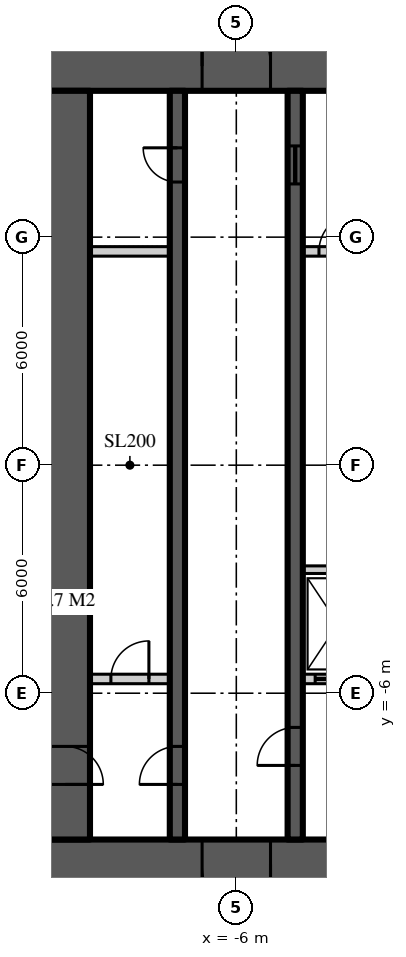
"""IFC4 building model, lengths in metres.
Left out: names, types, materials, properties, quantities, classifications, styles, units other than length and angle.
Written with IfcOpenShell. Run it as: python <this file> out.ifc"""

import sys

from ifc_helpers import new_model, si_unit, direction, frame, frame_2d, origin, place, context, subcontext, project, spatial, rectangle, extrude, element, fill, save


model = new_model("IFC4")
c1 = context("Model", 3, precision=1e-05, world=origin(), true_north=direction((0.0, 1.0)))
c2 = subcontext(c1, "Body", "Model", "MODEL_VIEW")
j1 = project(units=[si_unit("LENGTHUNIT", "METRE"), si_unit("PLANEANGLEUNIT", "RADIAN")], contexts=[c1])
p1 = place(None, origin())
s1 = spatial("IfcSite", under=j1, at=p1, CompositionType="ELEMENT")
p2 = place(p1, origin())
s2 = spatial("IfcBuilding", under=s1, at=p2, CompositionType="ELEMENT")
p3 = place(p2, frame((0.0, 0.0, 204.9)))
s3 = spatial("IfcBuildingStorey", under=s2, at=p3, CompositionType="ELEMENT", Elevation=204.9)
p4 = place(p3, frame((-11.15, 10.5, 0.0), z_axis=(0.0, 0.0, 1.0), x_axis=(1.0, 0.0, 0.0)))
e1 = element("IfcWall", 1, at=p4, inside=s3, PredefinedType="SHEAR", context=c2, shape_type="SweptSolid", body=[
    extrude(rectangle(XDim=22.3, YDim=1.3, at=frame_2d((11.15, 0.0))), origin(), (0.0, 0.0, 1.0), 3.9),
])
p5 = place(p4, frame((4.25, 0.0, 0.0)))
e2 = element("IfcOpeningElement", 2, at=p5, cuts=e1, PredefinedType="OPENING", context=c2, shape_type="SweptSolid", body=[
    extrude(rectangle(XDim=1.8, YDim=2.2, at=frame_2d((0.9, 1.1))), frame((0.0, 0.66, 0.0), z_axis=(0.0, -1.0, 0.0), x_axis=(1.0, 0.0, 0.0)), (0.0, 0.0, 1.0), 1.32),
])
p6 = place(p4, frame((16.25, 0.0, 0.0)))
e3 = element("IfcOpeningElement", 3, at=p6, cuts=e1, PredefinedType="OPENING", context=c2, shape_type="SweptSolid", body=[
    extrude(rectangle(XDim=1.8, YDim=2.2, at=frame_2d((0.9, 1.1))), frame((0.0, 0.66, 0.0), z_axis=(0.0, -1.0, 0.0), x_axis=(1.0, 0.0, 0.0)), (0.0, 0.0, 1.0), 1.32),
])
p7 = place(p3, frame((11.15, -10.5, 0.0), z_axis=(0.0, 0.0, 1.0), x_axis=(-1.0, 0.0, 0.0)))
e4 = element("IfcWall", 4, at=p7, inside=s3, PredefinedType="SHEAR", context=c2, shape_type="SweptSolid", body=[
    extrude(rectangle(XDim=22.3, YDim=1.3, at=frame_2d((11.15, 0.0))), origin(), (0.0, 0.0, 1.0), 3.9),
])
p8 = place(p7, frame((16.25, 0.0, 0.0)))
e5 = element("IfcOpeningElement", 5, at=p8, cuts=e4, PredefinedType="OPENING", context=c2, shape_type="SweptSolid", body=[
    extrude(rectangle(XDim=1.8, YDim=2.2, at=frame_2d((0.9, 1.1))), frame((0.0, 0.66, 0.0), z_axis=(0.0, -1.0, 0.0), x_axis=(1.0, 0.0, 0.0)), (0.0, 0.0, 1.0), 1.32),
])
p9 = place(p7, frame((4.25, 0.0, 0.0)))
e6 = element("IfcOpeningElement", 6, at=p9, cuts=e4, PredefinedType="OPENING", context=c2, shape_type="SweptSolid", body=[
    extrude(rectangle(XDim=1.8, YDim=2.2, at=frame_2d((0.9, 1.1))), frame((0.0, 0.66, 0.0), z_axis=(0.0, -1.0, 0.0), x_axis=(1.0, 0.0, 0.0)), (0.0, 0.0, 1.0), 1.32),
])
p10 = place(p3, frame((-10.5, 9.85, 0.0), z_axis=(0.0, 0.0, 1.0), x_axis=(0.0, -1.0, 0.0)))
e7 = element("IfcWall", 7, at=p10, inside=s3, PredefinedType="SHEAR", context=c2, shape_type="SweptSolid", body=[
    extrude(rectangle(XDim=19.7, YDim=1.3, at=frame_2d((9.85, 0.0))), origin(), (0.0, 0.0, 1.0), 3.9),
])
p11 = place(p10, frame((17.25, 0.0, 0.0)))
e8 = element("IfcOpeningElement", 8, at=p11, cuts=e7, PredefinedType="OPENING", context=c2, shape_type="SweptSolid", body=[
    extrude(rectangle(XDim=1.0, YDim=2.2, at=frame_2d((0.5, 1.1))), frame((0.0, 0.66, 0.0), z_axis=(0.0, -1.0, 0.0), x_axis=(1.0, 0.0, 0.0)), (0.0, 0.0, 1.0), 1.32),
])
p12 = place(p3, frame((-7.55, -9.85, 0.0), z_axis=(0.0, 0.0, 1.0), x_axis=(0.0, 1.0, 0.0)))
e9 = element("IfcWall", 9, at=p12, inside=s3, PredefinedType="SHEAR", context=c2, shape_type="SweptSolid", body=[
    extrude(rectangle(XDim=19.7, YDim=0.4, at=frame_2d((9.85, 0.0))), origin(), (0.0, 0.0, 1.0), 3.9),
])
p13 = place(p12, frame((1.45, 0.0, 0.0)))
e10 = element("IfcOpeningElement", 10, at=p13, cuts=e9, PredefinedType="OPENING", context=c2, shape_type="SweptSolid", body=[
    extrude(rectangle(XDim=1.0, YDim=2.2, at=frame_2d((0.5, 1.1))), frame((0.0, 0.21, 0.0), z_axis=(0.0, -1.0, 0.0), x_axis=(1.0, 0.0, 0.0)), (0.0, 0.0, 1.0), 0.42),
])
p14 = place(p12, frame((17.3, 0.0, 0.0)))
e11 = element("IfcOpeningElement", 11, at=p14, cuts=e9, PredefinedType="OPENING", context=c2, shape_type="SweptSolid", body=[
    extrude(rectangle(XDim=0.9, YDim=2.1, at=frame_2d((0.45, 1.05))), frame((0.0, 0.21, 0.0), z_axis=(0.0, -1.0, 0.0), x_axis=(1.0, 0.0, 0.0)), (0.0, 0.0, 1.0), 0.42),
])
p15 = place(p3, frame((-4.45, -9.85, 0.0), z_axis=(0.0, 0.0, 1.0), x_axis=(0.0, 1.0, 0.0)))
e12 = element("IfcWall", 12, at=p15, inside=s3, PredefinedType="SHEAR", context=c2, shape_type="SweptSolid", body=[
    extrude(rectangle(XDim=19.7, YDim=0.4, at=frame_2d((9.85, 0.0))), origin(), (0.0, 0.0, 1.0), 3.9),
])
p16 = place(p15, frame((1.95, 0.0, 0.0)))
e13 = element("IfcOpeningElement", 13, at=p16, cuts=e12, PredefinedType="OPENING", context=c2, shape_type="SweptSolid", body=[
    extrude(rectangle(XDim=1.0, YDim=2.2, at=frame_2d((0.5, 1.1))), frame((0.0, 0.21, 0.0), z_axis=(0.0, -1.0, 0.0), x_axis=(1.0, 0.0, 0.0)), (0.0, 0.0, 1.0), 0.42),
])
p17 = place(p15, frame((17.25, 0.0, 0.0)))
e14 = element("IfcOpeningElement", 14, at=p17, cuts=e12, PredefinedType="OPENING", context=c2, shape_type="SweptSolid", body=[
    extrude(rectangle(XDim=1.0, YDim=2.1, at=frame_2d((0.5, 1.05))), frame((0.0, 0.21, 0.0), z_axis=(0.0, -1.0, 0.0), x_axis=(1.0, 0.0, 0.0)), (0.0, 0.0, 1.0), 0.42),
])
p18 = place(p3, frame((-9.85, 5.625, 0.0), z_axis=(0.0, 0.0, 1.0), x_axis=(1.0, 0.0, 0.0)))
e15 = element("IfcWall", 15, at=p18, inside=s3, PredefinedType="SOLIDWALL", context=c2, shape_type="SweptSolid", body=[
    extrude(rectangle(XDim=2.1, YDim=0.25, at=frame_2d((1.05, 0.0))), origin(), (0.0, 0.0, 1.0), 3.7),
])
p19 = place(p3, frame((-4.25, 5.625, 0.0), z_axis=(0.0, 0.0, 1.0), x_axis=(1.0, 0.0, 0.0)))
e16 = element("IfcWall", 16, at=p19, inside=s3, PredefinedType="SOLIDWALL", context=c2, shape_type="SweptSolid", body=[
    extrude(rectangle(XDim=1.85, YDim=0.25, at=frame_2d((0.925, 0.0))), origin(), (0.0, 0.0, 1.0), 3.7),
])
p20 = place(p19, frame((0.425, 0.0, 0.0)))
e17 = element("IfcOpeningElement", 17, at=p20, cuts=e16, PredefinedType="OPENING", context=c2, shape_type="SweptSolid", body=[
    extrude(rectangle(XDim=1.0, YDim=2.2, at=frame_2d((0.5, 1.1))), frame((0.0, 0.135, 0.0), z_axis=(0.0, -1.0, 0.0), x_axis=(1.0, 0.0, 0.0)), (0.0, 0.0, 1.0), 0.27),
])
p21 = place(p3, frame((-9.85, -5.625, 0.0), z_axis=(0.0, 0.0, 1.0), x_axis=(1.0, 0.0, 0.0)))
e18 = element("IfcWall", 18, at=p21, inside=s3, PredefinedType="SOLIDWALL", context=c2, shape_type="SweptSolid", body=[
    extrude(rectangle(XDim=2.1, YDim=0.25, at=frame_2d((1.05, 0.0))), origin(), (0.0, 0.0, 1.0), 3.7),
])
p22 = place(p21, frame((0.55, 0.0, 0.0)))
e19 = element("IfcOpeningElement", 19, at=p22, cuts=e18, PredefinedType="OPENING", context=c2, shape_type="SweptSolid", body=[
    extrude(rectangle(XDim=1.0, YDim=2.2, at=frame_2d((0.5, 1.1))), frame((0.0, 0.135, 0.0), z_axis=(0.0, -1.0, 0.0), x_axis=(1.0, 0.0, 0.0)), (0.0, 0.0, 1.0), 0.27),
])
p23 = place(p3, frame((-4.25, -5.625, 0.0), z_axis=(0.0, 0.0, 1.0), x_axis=(1.0, 0.0, 0.0)))
e20 = element("IfcWall", 20, at=p23, inside=s3, PredefinedType="SOLIDWALL", context=c2, shape_type="SweptSolid", body=[
    extrude(rectangle(XDim=1.85, YDim=0.25, at=frame_2d((0.925, 0.0))), origin(), (0.0, 0.0, 1.0), 3.7),
])
p24 = place(p23, frame((0.325, 0.0, 0.0)))
e21 = element("IfcOpeningElement", 21, at=p24, cuts=e20, PredefinedType="OPENING", context=c2, shape_type="SweptSolid", body=[
    extrude(rectangle(XDim=1.2, YDim=2.2, at=frame_2d((0.6, 1.1))), frame((0.0, 0.135, 0.0), z_axis=(0.0, -1.0, 0.0), x_axis=(1.0, 0.0, 0.0)), (0.0, 0.0, 1.0), 0.27),
])
p25 = place(p3, frame((-4.25, -2.75, 0.0), z_axis=(0.0, 0.0, 1.0), x_axis=(1.0, 0.0, 0.0)))
e22 = element("IfcWall", 22, at=p25, inside=s3, PredefinedType="SOLIDWALL", context=c2, shape_type="SweptSolid", body=[
    extrude(rectangle(XDim=1.85, YDim=0.2, at=frame_2d((0.925, 0.0))), origin(), (0.0, 0.0, 1.0), 3.7),
])
p26 = place(p5, origin())
e23 = element("IfcDoor", 23, at=p26, inside=s3, OperationType="DOUBLE_DOOR_DOUBLE_SWING", PredefinedType="DOOR", context=c2, shape_type="SweptSolid", body=[
    extrude(rectangle(XDim=1.8, YDim=2.2, at=frame_2d((0.9, 1.1))), frame((0.0, 0.025, 0.0), z_axis=(0.0, -1.0, 0.0), x_axis=(1.0, 0.0, 0.0)), (0.0, 0.0, 1.0), 0.05),
])
fill(e2, e23)
p27 = place(p8, origin())
e24 = element("IfcDoor", 24, at=p27, inside=s3, OperationType="DOUBLE_DOOR_DOUBLE_SWING", PredefinedType="DOOR", context=c2, shape_type="SweptSolid", body=[
    extrude(rectangle(XDim=1.8, YDim=2.2, at=frame_2d((0.9, 1.1))), frame((0.0, 0.025, 0.0), z_axis=(0.0, -1.0, 0.0), x_axis=(1.0, 0.0, 0.0)), (0.0, 0.0, 1.0), 0.05),
])
fill(e5, e24)
p28 = place(p13, origin())
e25 = element("IfcDoor", 25, at=p28, inside=s3, OperationType="SINGLE_SWING_LEFT", PredefinedType="DOOR", context=c2, shape_type="SweptSolid", body=[
    extrude(rectangle(XDim=1.0, YDim=2.2, at=frame_2d((0.5, 1.1))), frame((0.0, 0.025, 0.0), z_axis=(0.0, -1.0, 0.0), x_axis=(1.0, 0.0, 0.0)), (0.0, 0.0, 1.0), 0.05),
])
fill(e10, e25)
p29 = place(p11, origin())
e26 = element("IfcDoor", 26, at=p29, inside=s3, OperationType="SINGLE_SWING_RIGHT", PredefinedType="DOOR", context=c2, shape_type="SweptSolid", body=[
    extrude(rectangle(XDim=1.0, YDim=2.2, at=frame_2d((0.5, 1.1))), frame((0.0, 0.025, 0.0), z_axis=(0.0, -1.0, 0.0), x_axis=(1.0, 0.0, 0.0)), (0.0, 0.0, 1.0), 0.05),
])
fill(e8, e26)
p30 = place(p16, origin())
e27 = element("IfcDoor", 27, at=p30, inside=s3, OperationType="SINGLE_SWING_LEFT", PredefinedType="DOOR", context=c2, shape_type="SweptSolid", body=[
    extrude(rectangle(XDim=1.0, YDim=2.2, at=frame_2d((0.5, 1.1))), frame((0.0, 0.025, 0.0), z_axis=(0.0, -1.0, 0.0), x_axis=(1.0, 0.0, 0.0)), (0.0, 0.0, 1.0), 0.05),
])
fill(e13, e27)
p31 = place(p14, origin())
e28 = element("IfcDoor", 28, at=p31, inside=s3, OperationType="SINGLE_SWING_RIGHT", PredefinedType="DOOR", context=c2, shape_type="SweptSolid", body=[
    extrude(rectangle(XDim=0.9, YDim=2.1, at=frame_2d((0.45, 1.05))), frame((0.0, 0.025, 0.0), z_axis=(0.0, -1.0, 0.0), x_axis=(1.0, 0.0, 0.0)), (0.0, 0.0, 1.0), 0.05),
])
fill(e11, e28)
p32 = place(p17, origin())
e29 = element("IfcDoor", 29, at=p32, inside=s3, OperationType="SLIDING_TO_LEFT", PredefinedType="DOOR", context=c2, shape_type="SweptSolid", body=[
    extrude(rectangle(XDim=1.0, YDim=2.1, at=frame_2d((0.5, 1.05))), frame((0.0, 0.025, 0.0), z_axis=(0.0, -1.0, 0.0), x_axis=(1.0, 0.0, 0.0)), (0.0, 0.0, 1.0), 0.05),
])
fill(e14, e29)
p33 = place(p24, origin())
e30 = element("IfcDoor", 30, at=p33, inside=s3, OperationType="SLIDING_TO_LEFT", PredefinedType="DOOR", context=c2, shape_type="SweptSolid", body=[
    extrude(rectangle(XDim=1.2, YDim=2.2, at=frame_2d((0.6, 1.1))), frame((0.0, 0.025, 0.0), z_axis=(0.0, -1.0, 0.0), x_axis=(1.0, 0.0, 0.0)), (0.0, 0.0, 1.0), 0.05),
])
fill(e21, e30)
p34 = place(p22, origin())
e31 = element("IfcDoor", 31, at=p34, inside=s3, OperationType="SINGLE_SWING_RIGHT", PredefinedType="DOOR", context=c2, shape_type="SweptSolid", body=[
    extrude(rectangle(XDim=1.0, YDim=2.2, at=frame_2d((0.5, 1.1))), frame((0.0, 0.025, 0.0), z_axis=(0.0, -1.0, 0.0), x_axis=(1.0, 0.0, 0.0)), (0.0, 0.0, 1.0), 0.05),
])
fill(e19, e31)
p35 = place(p20, origin())
e32 = element("IfcDoor", 32, at=p35, inside=s3, OperationType="SINGLE_SWING_RIGHT", PredefinedType="DOOR", context=c2, shape_type="SweptSolid", body=[
    extrude(rectangle(XDim=1.0, YDim=2.2, at=frame_2d((0.5, 1.1))), frame((0.0, 0.025, 0.0), z_axis=(0.0, -1.0, 0.0), x_axis=(1.0, 0.0, 0.0)), (0.0, 0.0, 1.0), 0.05),
])
fill(e17, e32)
save(model, sys.argv[1])
